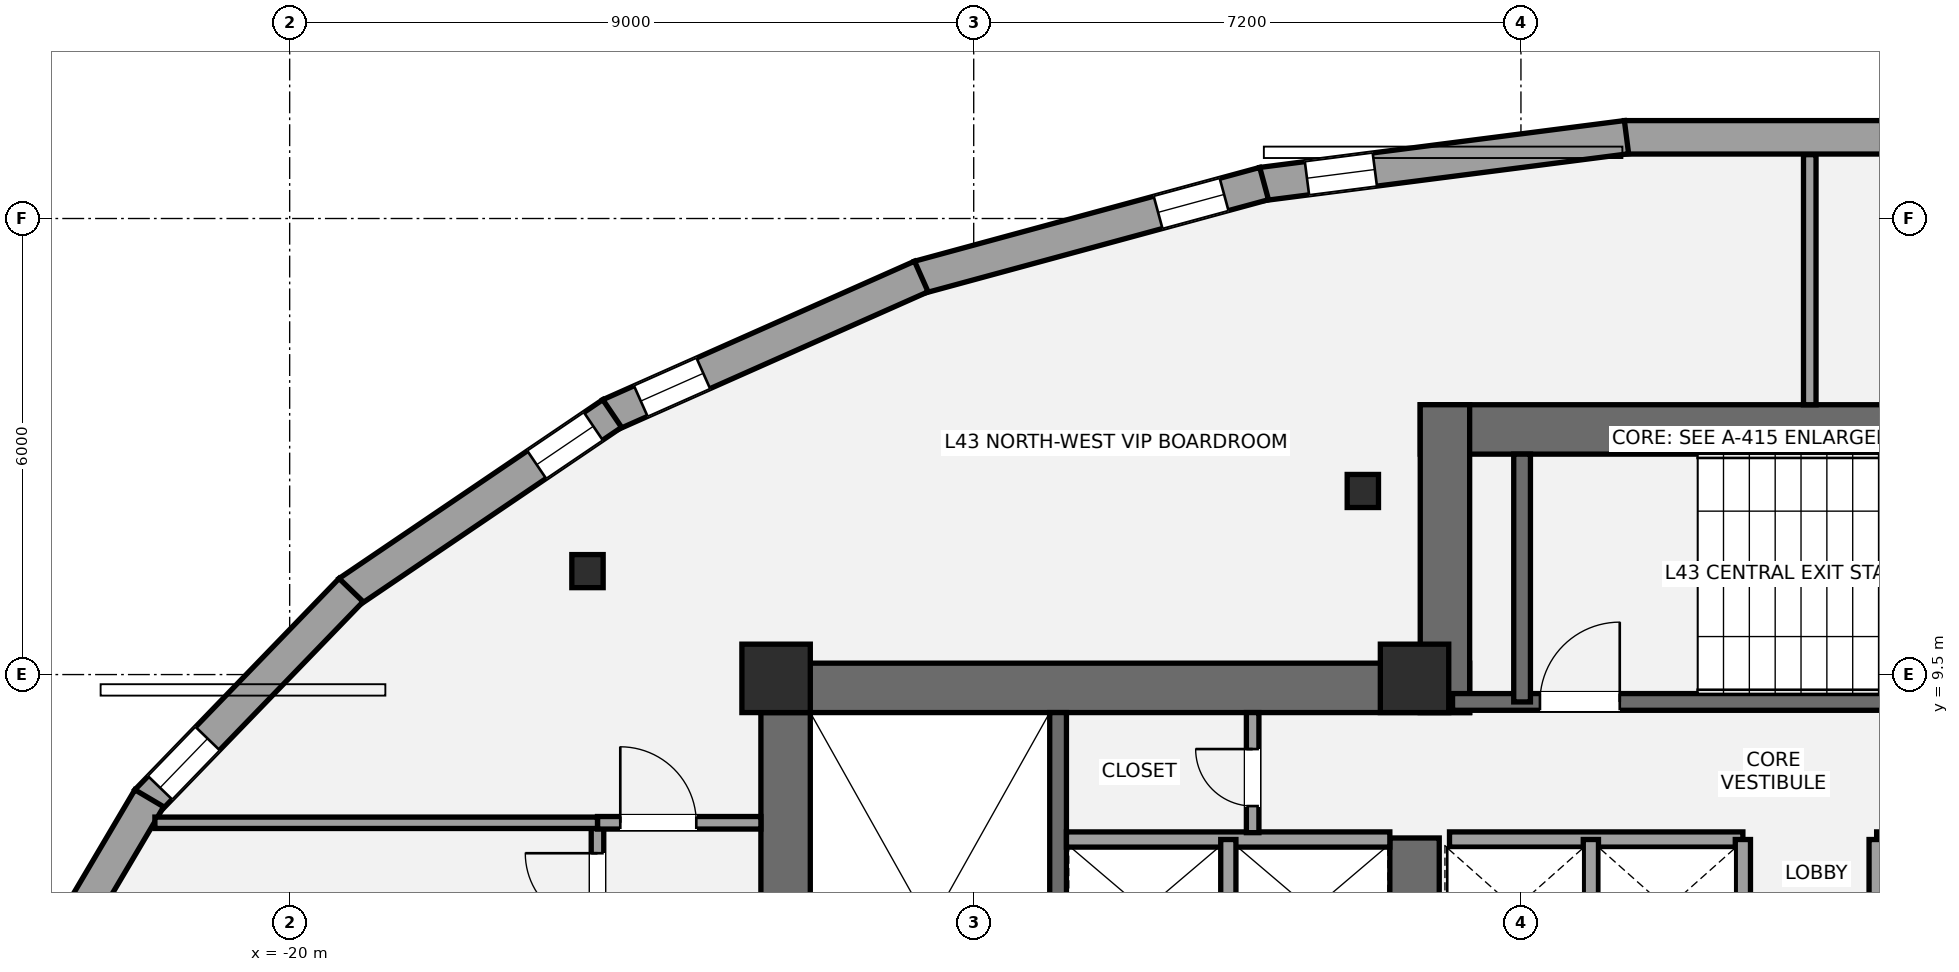
"""IFC4 building model, lengths in metres.
Left out: names, types, materials, properties, quantities, classifications, styles, units other than length and angle.
Written with IfcOpenShell. Run it as: python <this file> out.ifc"""

import sys

from ifc_helpers import new_model, si_unit, direction, frame, frame_2d, origin, origin_2d, place, context, subcontext, project, spatial, rectangle, i_section, extrude, element, fill, save


model = new_model("IFC4")
c1 = context("Model", 3, precision=1e-05, world=origin(), true_north=direction((0.0, 1.0)))
c2 = subcontext(c1, "Body", "Model", "MODEL_VIEW")
j1 = project(units=[si_unit("LENGTHUNIT", "METRE"), si_unit("PLANEANGLEUNIT", "RADIAN")], contexts=[c1])
p1 = place(None, origin())
s1 = spatial("IfcSite", under=j1, at=p1, CompositionType="ELEMENT")
p2 = place(p1, origin())
s2 = spatial("IfcBuilding", under=s1, at=p2, CompositionType="ELEMENT")
p3 = place(p2, frame((0.0, 0.0, 159.8)))
s3 = spatial("IfcBuildingStorey", under=s2, at=p3, CompositionType="ELEMENT", Elevation=159.8)
p4 = place(p3, frame((-13.475, 1.2, 0.0), z_axis=(0.0, 0.0, 1.0), x_axis=(0.0, 1.0, 0.0)))
e1 = element("IfcWall", 1, at=p4, inside=s3, PredefinedType="SHEAR", context=c2, shape_type="SweptSolid", body=[
    extrude(rectangle(XDim=8.45, YDim=0.65, at=frame_2d((4.225, 0.0))), origin(), (0.0, 0.0, 1.0), 3.2),
])
p5 = place(p3, frame((-13.8, 9.325, 0.0), z_axis=(0.0, 0.0, 1.0), x_axis=(1.0, 0.0, 0.0)))
e2 = element("IfcWall", 2, at=p5, inside=s3, PredefinedType="SHEAR", context=c2, shape_type="SweptSolid", body=[
    extrude(rectangle(XDim=9.325, YDim=0.65, at=frame_2d((4.663, 0.0))), origin(), (0.0, 0.0, 1.0), 3.2),
])
p6 = place(p3, frame((-5.2, 5.35, 0.0), z_axis=(0.0, 0.0, 1.0), x_axis=(0.0, 1.0, 0.0)))
e3 = element("IfcWall", 3, at=p6, inside=s3, PredefinedType="SHEAR", context=c2, shape_type="SweptSolid", body=[
    extrude(rectangle(XDim=2.0, YDim=0.65, at=frame_2d((1.0, 0.0))), origin(), (0.0, 0.0, 1.0), 3.2),
])
p7 = place(p3, frame((-9.89, 1.85, 0.0), z_axis=(0.0, 0.0, 1.0), x_axis=(0.0, 1.0, 0.0)))
e4 = element("IfcWall", 4, at=p7, inside=s3, PredefinedType="SHEAR", context=c2, shape_type="SweptSolid", body=[
    extrude(rectangle(XDim=7.15, YDim=0.22, at=frame_2d((3.575, 0.0))), origin(), (0.0, 0.0, 1.0), 3.2),
])
p8 = place(p3, frame((-5.125, 12.725, 0.0), z_axis=(0.0, 0.0, 1.0), x_axis=(1.0, 0.0, 0.0)))
e5 = element("IfcWall", 5, at=p8, inside=s3, PredefinedType="SHEAR", context=c2, shape_type="SweptSolid", body=[
    extrude(rectangle(XDim=10.25, YDim=0.65, at=frame_2d((5.125, 0.0))), origin(), (0.0, 0.0, 1.0), 3.2),
])
p9 = place(p3, frame((-4.8, 9.0, 0.0), z_axis=(0.0, 0.0, 1.0), x_axis=(0.0, 1.0, 0.0)))
e6 = element("IfcWall", 6, at=p9, inside=s3, PredefinedType="SHEAR", context=c2, shape_type="SweptSolid", body=[
    extrude(rectangle(XDim=4.05, YDim=0.65, at=frame_2d((2.025, 0.0))), origin(), (0.0, 0.0, 1.0), 3.2),
])
p10 = place(p3, frame((-4.7, 9.14, 0.0), z_axis=(0.0, 0.0, 1.0), x_axis=(1.0, 0.0, 0.0)))
e7 = element("IfcWall", 7, at=p10, inside=s3, PredefinedType="SHEAR", context=c2, shape_type="SweptSolid", body=[
    extrude(rectangle(XDim=9.3, YDim=0.22, at=frame_2d((4.65, 0.0))), origin(), (0.0, 0.0, 1.0), 3.2),
])
p11 = place(p10, frame((1.15, 0.0, 0.0)))
e8 = element("IfcOpeningElement", 8, at=p11, cuts=e7, PredefinedType="OPENING", context=c2, shape_type="SweptSolid", body=[
    extrude(rectangle(XDim=1.05, YDim=2.15, at=frame_2d((0.525, 1.075))), frame((0.0, 0.12, 0.0), z_axis=(0.0, -1.0, 0.0), x_axis=(1.0, 0.0, 0.0)), (0.0, 0.0, 1.0), 0.24),
])
p12 = place(p3, frame((-3.785, 9.14, 0.0), z_axis=(0.0, 0.0, 1.0), x_axis=(0.0, 1.0, 0.0)))
e9 = element("IfcWall", 9, at=p12, inside=s3, PredefinedType="SHEAR", context=c2, shape_type="SweptSolid", body=[
    extrude(rectangle(XDim=3.26, YDim=0.22, at=frame_2d((1.63, 0.0))), origin(), (0.0, 0.0, 1.0), 3.2),
])
for number, where, z_axis, x_axis in (
    (10, (-13.6, 9.45, 0.0), (0.0, 0.0, 1.0), (1.0, 0.0, 0.0)),
    (11, (-5.2, 9.45, 0.0), (0.0, 0.0, 1.0), (1.0, 0.0, 0.0)),
):
    element("IfcColumn", number, at=place(p3, frame(where, z_axis=z_axis, x_axis=x_axis)), inside=s3, PredefinedType="COLUMN", context=c2, shape_type="SweptSolid", body=[
        extrude(rectangle(XDim=0.9, YDim=0.9, at=origin_2d()), origin(), (0.0, 0.0, 1.0), 3.2),
    ])
for number, where, z_axis, x_axis in (
    (12, (-5.88, 11.915, 0.0), (0.0, 0.0, 1.0), (1.0, 0.0, 0.0)),
    (13, (-16.082, 10.861, 0.0), (0.0, 0.0, 1.0), (1.0, 0.0, 0.0)),
):
    element("IfcColumn", number, at=place(p3, frame(where, z_axis=z_axis, x_axis=x_axis)), inside=s3, PredefinedType="COLUMN", context=c2, shape_type="SweptSolid", body=[
        extrude(i_section(OverallWidth=0.412, OverallDepth=0.435, WebThickness=0.036, FlangeThickness=0.057, at=origin_2d()), origin(), (0.0, 0.0, 1.0), 3.2),
    ])
p13 = place(p3, frame((-2.439, 16.568, 0.0), z_axis=(0.0, 0.0, 1.0), x_axis=(1.0, 0.0, 0.0)))
e14 = element("IfcWall", 14, at=p13, inside=s3, PredefinedType="STANDARD", context=c2, shape_type="SweptSolid", body=[
    extrude(rectangle(XDim=4.878, YDim=0.44, at=frame_2d((2.439, 0.0))), origin(), (0.0, 0.0, 1.0), 2.315),
])
p14 = place(p13, frame((3.381, 0.0, 0.58)))
e15 = element("IfcOpeningElement", 15, at=p14, cuts=e14, PredefinedType="OPENING", context=c2, shape_type="SweptSolid", body=[
    extrude(rectangle(XDim=0.9, YDim=1.35, at=frame_2d((0.45, 0.675))), frame((0.0, 0.23, 0.0), z_axis=(0.0, -1.0, 0.0), x_axis=(1.0, 0.0, 0.0)), (0.0, 0.0, 1.0), 0.46),
])
p15 = place(p3, frame((-7.209, 15.954, 0.0), z_axis=(0.0, 0.0, 1.0), x_axis=(0.991852910824, 0.127388395426, 0.0)))
e16 = element("IfcWall", 16, at=p15, inside=s3, PredefinedType="STANDARD", context=c2, shape_type="SweptSolid", body=[
    extrude(rectangle(XDim=4.837, YDim=0.44, at=frame_2d((2.418, 0.0))), origin(), (0.0, 0.0, 1.0), 2.315),
])
p16 = place(p15, frame((0.598, 0.0, 0.58)))
e17 = element("IfcOpeningElement", 17, at=p16, cuts=e16, PredefinedType="OPENING", context=c2, shape_type="SweptSolid", body=[
    extrude(rectangle(XDim=0.9, YDim=1.35, at=frame_2d((0.45, 0.675))), frame((0.0, 0.23, 0.0), z_axis=(0.0, -1.0, 0.0), x_axis=(1.0, 0.0, 0.0)), (0.0, 0.0, 1.0), 0.46),
])
p17 = place(p3, frame((-11.721, 14.726, 0.0), z_axis=(0.0, 0.0, 1.0), x_axis=(0.965037424263, 0.262112132058, 0.0)))
e18 = element("IfcWall", 18, at=p17, inside=s3, PredefinedType="STANDARD", context=c2, shape_type="SweptSolid", body=[
    extrude(rectangle(XDim=4.707, YDim=0.44, at=frame_2d((2.353, 0.0))), origin(), (0.0, 0.0, 1.0), 2.315),
])
p18 = place(p17, frame((3.261, 0.0, 0.58)))
e19 = element("IfcOpeningElement", 19, at=p18, cuts=e18, PredefinedType="OPENING", context=c2, shape_type="SweptSolid", body=[
    extrude(rectangle(XDim=0.9, YDim=1.35, at=frame_2d((0.45, 0.675))), frame((0.0, 0.23, 0.0), z_axis=(0.0, -1.0, 0.0), x_axis=(1.0, 0.0, 0.0)), (0.0, 0.0, 1.0), 0.46),
])
p19 = place(p3, frame((-15.791, 12.916, 0.0), z_axis=(0.0, 0.0, 1.0), x_axis=(0.913907994914, 0.405921392431, 0.0)))
e20 = element("IfcWall", 20, at=p19, inside=s3, PredefinedType="STANDARD", context=c2, shape_type="SweptSolid", body=[
    extrude(rectangle(XDim=4.487, YDim=0.44, at=frame_2d((2.244, 0.0))), origin(), (0.0, 0.0, 1.0), 2.315),
])
p20 = place(p19, frame((0.449, 0.0, 0.58)))
e21 = element("IfcOpeningElement", 21, at=p20, cuts=e20, PredefinedType="OPENING", context=c2, shape_type="SweptSolid", body=[
    extrude(rectangle(XDim=0.9, YDim=1.35, at=frame_2d((0.45, 0.675))), frame((0.0, 0.23, 0.0), z_axis=(0.0, -1.0, 0.0), x_axis=(1.0, 0.0, 0.0)), (0.0, 0.0, 1.0), 0.46),
])
p21 = place(p3, frame((-19.227, 10.583, 0.0), z_axis=(0.0, 0.0, 1.0), x_axis=(0.827760762475, 0.561081206338, 0.0)))
e22 = element("IfcWall", 22, at=p21, inside=s3, PredefinedType="STANDARD", context=c2, shape_type="SweptSolid", body=[
    extrude(rectangle(XDim=4.192, YDim=0.44, at=frame_2d((2.096, 0.0))), origin(), (0.0, 0.0, 1.0), 2.315),
])
p22 = place(p21, frame((2.992, 0.0, 0.58)))
e23 = element("IfcOpeningElement", 23, at=p22, cuts=e22, PredefinedType="OPENING", context=c2, shape_type="SweptSolid", body=[
    extrude(rectangle(XDim=0.9, YDim=1.35, at=frame_2d((0.45, 0.675))), frame((0.0, 0.23, 0.0), z_axis=(0.0, -1.0, 0.0), x_axis=(1.0, 0.0, 0.0)), (0.0, 0.0, 1.0), 0.46),
])
p23 = place(p3, frame((-21.879, 7.832, 0.0), z_axis=(0.0, 0.0, 1.0), x_axis=(0.694975307772, 0.719033602544, 0.0)))
e24 = element("IfcWall", 24, at=p23, inside=s3, PredefinedType="STANDARD", context=c2, shape_type="SweptSolid", body=[
    extrude(rectangle(XDim=3.866, YDim=0.44, at=frame_2d((1.933, 0.0))), origin(), (0.0, 0.0, 1.0), 2.315),
])
p24 = place(p23, frame((0.25, 0.0, 0.42)))
e25 = element("IfcOpeningElement", 25, at=p24, cuts=e24, PredefinedType="OPENING", context=c2, shape_type="SweptSolid", body=[
    extrude(rectangle(XDim=0.9, YDim=1.35, at=frame_2d((0.45, 0.675))), frame((0.0, 0.23, 0.0), z_axis=(0.0, -1.0, 0.0), x_axis=(1.0, 0.0, 0.0)), (0.0, 0.0, 1.0), 0.46),
])
p25 = place(p3, frame((-23.667, 4.794, 0.0), z_axis=(0.0, 0.0, 1.0), x_axis=(0.508883387051, 0.860835465338, 0.0)))
e26 = element("IfcWall", 26, at=p25, inside=s3, PredefinedType="STANDARD", context=c2, shape_type="SweptSolid", body=[
    extrude(rectangle(XDim=3.577, YDim=0.44, at=frame_2d((1.788, 0.0))), origin(), (0.0, 0.0, 1.0), 2.315),
])
p26 = place(p25, frame((0.339, 0.0, 0.58)))
e27 = element("IfcOpeningElement", 27, at=p26, cuts=e26, PredefinedType="OPENING", context=c2, shape_type="SweptSolid", body=[
    extrude(rectangle(XDim=0.56, YDim=1.15, at=frame_2d((0.28, 0.575))), frame((0.0, 0.23, 0.0), z_axis=(0.0, -1.0, 0.0), x_axis=(1.0, 0.0, 0.0)), (0.0, 0.0, 1.0), 0.46),
])
p27 = place(p3, frame((-9.78, 7.33, 0.0), z_axis=(0.0, 0.0, 1.0), x_axis=(1.0, 0.0, 0.0)))
e28 = element("IfcWall", 28, at=p27, inside=s3, PredefinedType="SOLIDWALL", context=c2, shape_type="SweptSolid", body=[
    extrude(rectangle(XDim=4.255, YDim=0.2, at=frame_2d((2.127, 0.0))), origin(), (0.0, 0.0, 1.0), 3.02),
])
p28 = place(p3, frame((-7.65, 5.47, 0.0), z_axis=(0.0, 0.0, 1.0), x_axis=(0.0, 1.0, 0.0)))
e29 = element("IfcWall", 29, at=p28, inside=s3, PredefinedType="SOLIDWALL", context=c2, shape_type="SweptSolid", body=[
    extrude(rectangle(XDim=1.86, YDim=0.2, at=frame_2d((0.93, 0.0))), origin(), (0.0, 0.0, 1.0), 3.02),
])
for number, where, z_axis, x_axis in (
    (30, (-4.74, 7.33, 0.0), (0.0, 0.0, 1.0), (1.0, 0.0, 0.0)),
    (31, (0.88, 7.33, 0.0), (0.0, 0.0, 1.0), (1.0, 0.0, 0.0)),
):
    element("IfcWall", number, at=place(p3, frame(where, z_axis=z_axis, x_axis=x_axis)), inside=s3, PredefinedType="SOLIDWALL", context=c2, shape_type="SweptSolid", body=[
        extrude(rectangle(XDim=3.86, YDim=0.2, at=frame_2d((1.93, 0.0))), origin(), (0.0, 0.0, 1.0), 3.02),
    ])
for number, where, z_axis, x_axis in (
    (32, (-2.88, 5.52, 0.0), (0.0, 0.0, 1.0), (0.0, 1.0, 0.0)),
    (33, (-0.88, 5.52, 0.0), (0.0, 0.0, 1.0), (0.0, 1.0, 0.0)),
    (34, (0.88, 5.52, 0.0), (0.0, 0.0, 1.0), (0.0, 1.0, 0.0)),
):
    element("IfcWall", number, at=place(p3, frame(where, z_axis=z_axis, x_axis=x_axis)), inside=s3, PredefinedType="SOLIDWALL", context=c2, shape_type="SweptSolid", body=[
        extrude(rectangle(XDim=1.81, YDim=0.2, at=frame_2d((0.905, 0.0))), origin(), (0.0, 0.0, 1.0), 3.02),
    ])
p29 = place(p3, frame((-7.33, 7.42, 0.0), z_axis=(0.0, 0.0, 1.0), x_axis=(0.0, 1.0, 0.0)))
e35 = element("IfcWall", 35, at=p29, inside=s3, PredefinedType="PARTITIONING", context=c2, shape_type="SweptSolid", body=[
    extrude(rectangle(XDim=1.58, YDim=0.165, at=frame_2d((0.79, 0.0))), origin(), (0.0, 0.0, 1.0), 3.02),
])
p30 = place(p29, frame((0.35, 0.0, 0.0)))
e36 = element("IfcOpeningElement", 36, at=p30, cuts=e35, PredefinedType="OPENING", context=c2, shape_type="SweptSolid", body=[
    extrude(rectangle(XDim=0.75, YDim=2.1, at=frame_2d((0.375, 1.05))), frame((0.0, 0.093, 0.0), z_axis=(0.0, -1.0, 0.0), x_axis=(1.0, 0.0, 0.0)), (0.0, 0.0, 1.0), 0.185),
])
p31 = place(p3, frame((-15.95, -12.528, 0.0), z_axis=(0.0, 0.0, 1.0), x_axis=(0.0, 1.0, 0.0)))
e37 = element("IfcWall", 37, at=p31, inside=s3, PredefinedType="PARTITIONING", context=c2, shape_type="SweptSolid", body=[
    extrude(rectangle(XDim=20.078, YDim=0.165, at=frame_2d((10.039, 0.0))), origin(), (0.0, 0.0, 1.0), 2.473),
])
p32 = place(p31, frame((5.528, 0.0, 0.0)))
e38 = element("IfcOpeningElement", 38, at=p32, cuts=e37, PredefinedType="OPENING", context=c2, shape_type="SweptSolid", body=[
    extrude(rectangle(XDim=0.85, YDim=2.1, at=frame_2d((0.425, 1.05))), frame((0.0, 0.093, 0.0), z_axis=(0.0, -1.0, 0.0), x_axis=(1.0, 0.0, 0.0)), (0.0, 0.0, 1.0), 0.185),
])
p33 = place(p31, frame((12.978, 0.0, 0.0)))
e39 = element("IfcOpeningElement", 39, at=p33, cuts=e37, PredefinedType="OPENING", context=c2, shape_type="SweptSolid", body=[
    extrude(rectangle(XDim=0.95, YDim=2.15, at=frame_2d((0.475, 1.075))), frame((0.0, 0.093, 0.0), z_axis=(0.0, -1.0, 0.0), x_axis=(1.0, 0.0, 0.0)), (0.0, 0.0, 1.0), 0.185),
])
p34 = place(p31, frame((18.728, 0.0, 0.0)))
e40 = element("IfcOpeningElement", 40, at=p34, cuts=e37, PredefinedType="OPENING", context=c2, shape_type="SweptSolid", body=[
    extrude(rectangle(XDim=0.95, YDim=2.15, at=frame_2d((0.475, 1.075))), frame((0.0, 0.093, 0.0), z_axis=(0.0, -1.0, 0.0), x_axis=(1.0, 0.0, 0.0)), (0.0, 0.0, 1.0), 0.185),
])
p35 = place(p3, frame((-15.95, 7.55, 0.0), z_axis=(0.0, 0.0, 1.0), x_axis=(1.0, 0.0, 0.0)))
e41 = element("IfcWall", 41, at=p35, inside=s3, PredefinedType="PARTITIONING", context=c2, shape_type="SweptSolid", body=[
    extrude(rectangle(XDim=2.15, YDim=0.165, at=frame_2d((1.075, 0.0))), origin(), (0.0, 0.0, 1.0), 3.02),
])
p36 = place(p35, frame((0.3, 0.0, 0.0)))
e42 = element("IfcOpeningElement", 42, at=p36, cuts=e41, PredefinedType="OPENING", context=c2, shape_type="SweptSolid", body=[
    extrude(rectangle(XDim=1.0, YDim=2.15, at=frame_2d((0.5, 1.075))), frame((0.0, 0.093, 0.0), z_axis=(0.0, -1.0, 0.0), x_axis=(1.0, 0.0, 0.0)), (0.0, 0.0, 1.0), 0.185),
])
p37 = place(p3, frame((-21.773, 7.55, 0.0), z_axis=(0.0, 0.0, 1.0), x_axis=(1.0, 0.0, 0.0)))
e43 = element("IfcWall", 43, at=p37, inside=s3, PredefinedType="PLUMBINGWALL", context=c2, shape_type="SweptSolid", body=[
    extrude(rectangle(XDim=5.823, YDim=0.15, at=frame_2d((2.912, 0.0))), origin(), (0.0, 0.0, 1.0), 2.473),
])
p38 = place(p3, frame((0.0, 13.05, 0.0), z_axis=(0.0, 0.0, 1.0), x_axis=(0.0, 1.0, 0.0)))
e44 = element("IfcWall", 44, at=p38, inside=s3, PredefinedType="PARTITIONING", context=c2, shape_type="SweptSolid", body=[
    extrude(rectangle(XDim=3.29, YDim=0.165, at=frame_2d((1.645, 0.0))), origin(), (0.0, 0.0, 1.0), 3.02),
])
p39 = place(p16, origin())
e45 = element("IfcWindow", 45, at=p39, inside=s3, PartitioningType="SINGLE_PANEL", PredefinedType="WINDOW", context=c2, shape_type="SweptSolid", body=[
    extrude(rectangle(XDim=0.9, YDim=1.35, at=frame_2d((0.45, 0.675))), frame((0.0, -0.01, 0.0), z_axis=(0.0, -1.0, 0.0), x_axis=(1.0, 0.0, 0.0)), (0.0, 0.0, 1.0), 0.06),
])
fill(e17, e45)
p40 = place(p18, origin())
e46 = element("IfcWindow", 46, at=p40, inside=s3, PartitioningType="SINGLE_PANEL", PredefinedType="WINDOW", context=c2, shape_type="SweptSolid", body=[
    extrude(rectangle(XDim=0.9, YDim=1.35, at=frame_2d((0.45, 0.675))), frame((0.0, -0.01, 0.0), z_axis=(0.0, -1.0, 0.0), x_axis=(1.0, 0.0, 0.0)), (0.0, 0.0, 1.0), 0.06),
])
fill(e19, e46)
p41 = place(p20, origin())
e47 = element("IfcWindow", 47, at=p41, inside=s3, PartitioningType="SINGLE_PANEL", PredefinedType="WINDOW", context=c2, shape_type="SweptSolid", body=[
    extrude(rectangle(XDim=0.9, YDim=1.35, at=frame_2d((0.45, 0.675))), frame((0.0, -0.01, 0.0), z_axis=(0.0, -1.0, 0.0), x_axis=(1.0, 0.0, 0.0)), (0.0, 0.0, 1.0), 0.06),
])
fill(e21, e47)
p42 = place(p22, origin())
e48 = element("IfcWindow", 48, at=p42, inside=s3, PartitioningType="SINGLE_PANEL", PredefinedType="WINDOW", context=c2, shape_type="SweptSolid", body=[
    extrude(rectangle(XDim=0.9, YDim=1.35, at=frame_2d((0.45, 0.675))), frame((0.0, -0.01, 0.0), z_axis=(0.0, -1.0, 0.0), x_axis=(1.0, 0.0, 0.0)), (0.0, 0.0, 1.0), 0.06),
])
fill(e23, e48)
p43 = place(p24, origin())
e49 = element("IfcWindow", 49, at=p43, inside=s3, PartitioningType="SINGLE_PANEL", PredefinedType="WINDOW", context=c2, shape_type="SweptSolid", body=[
    extrude(rectangle(XDim=0.9, YDim=1.35, at=frame_2d((0.45, 0.675))), frame((0.0, -0.01, 0.0), z_axis=(0.0, -1.0, 0.0), x_axis=(1.0, 0.0, 0.0)), (0.0, 0.0, 1.0), 0.06),
])
fill(e25, e49)
p44 = place(p11, origin())
e50 = element("IfcDoor", 50, at=p44, inside=s3, OperationType="SINGLE_SWING_RIGHT", PredefinedType="DOOR", context=c2, shape_type="SweptSolid", body=[
    extrude(rectangle(XDim=1.05, YDim=2.15, at=frame_2d((0.525, 1.075))), frame((0.0, 0.025, 0.0), z_axis=(0.0, -1.0, 0.0), x_axis=(1.0, 0.0, 0.0)), (0.0, 0.0, 1.0), 0.05),
])
fill(e8, e50)
p45 = place(p30, origin())
e51 = element("IfcDoor", 51, at=p45, inside=s3, OperationType="SINGLE_SWING_RIGHT", PredefinedType="DOOR", context=c2, shape_type="SweptSolid", body=[
    extrude(rectangle(XDim=0.75, YDim=2.1, at=frame_2d((0.375, 1.05))), frame((0.0, 0.025, 0.0), z_axis=(0.0, -1.0, 0.0), x_axis=(1.0, 0.0, 0.0)), (0.0, 0.0, 1.0), 0.05),
])
fill(e36, e51)
p46 = place(p36, origin())
e52 = element("IfcDoor", 52, at=p46, inside=s3, OperationType="SINGLE_SWING_LEFT", PredefinedType="DOOR", context=c2, shape_type="SweptSolid", body=[
    extrude(rectangle(XDim=1.0, YDim=2.15, at=frame_2d((0.5, 1.075))), frame((0.0, 0.025, 0.0), z_axis=(0.0, -1.0, 0.0), x_axis=(1.0, 0.0, 0.0)), (0.0, 0.0, 1.0), 0.05),
])
fill(e42, e52)
p47 = place(p34, origin())
e53 = element("IfcDoor", 53, at=p47, inside=s3, OperationType="SINGLE_SWING_RIGHT", PredefinedType="DOOR", context=c2, shape_type="SweptSolid", body=[
    extrude(rectangle(XDim=0.95, YDim=2.15, at=frame_2d((0.475, 1.075))), frame((0.0, 0.025, 0.0), z_axis=(0.0, -1.0, 0.0), x_axis=(1.0, 0.0, 0.0)), (0.0, 0.0, 1.0), 0.05),
])
fill(e40, e53)
save(model, sys.argv[1])
